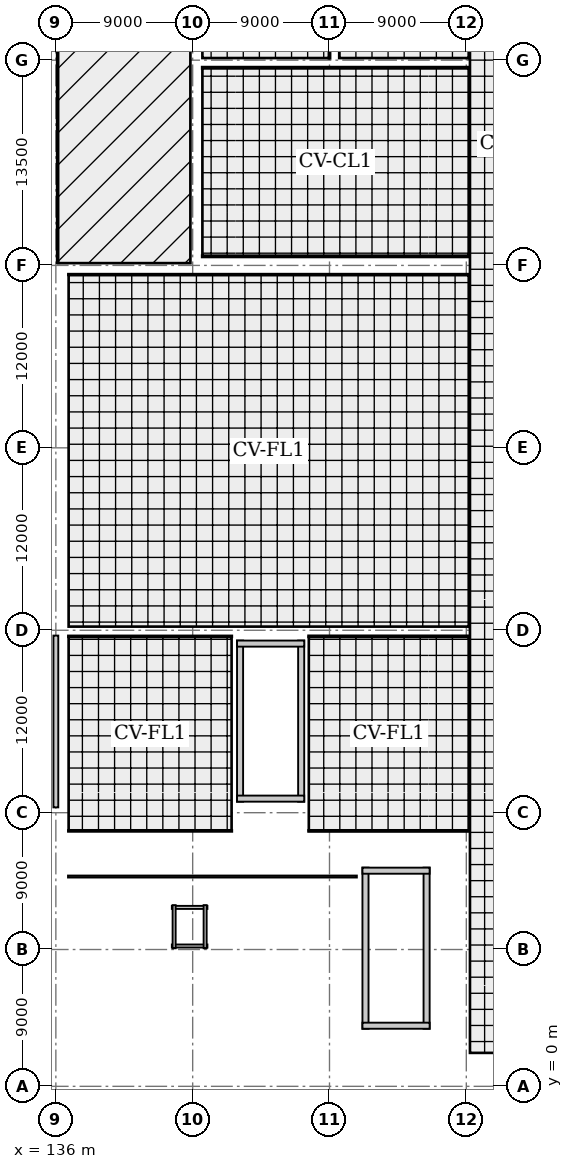
"""IFC4 building model, lengths in metres.
Left out: names, types, materials, properties, quantities, classifications, styles, units other than length and angle.
Written with IfcOpenShell. Run it as: python <this file> out.ifc"""

import sys

from ifc_helpers import new_model, si_unit, direction, frame, frame_2d, origin, origin_2d, place, context, subcontext, project, spatial, rectangle, extrude, element, fill, save


model = new_model("IFC4")
c1 = context("Model", 3, precision=1e-05, world=origin(), true_north=direction((0.0, 1.0)))
c2 = subcontext(c1, "Body", "Model", "MODEL_VIEW")
j1 = project(units=[si_unit("LENGTHUNIT", "METRE"), si_unit("PLANEANGLEUNIT", "RADIAN")], contexts=[c1])
p1 = place(None, origin())
s1 = spatial("IfcSite", under=j1, at=p1, CompositionType="ELEMENT")
p2 = place(p1, origin())
s2 = spatial("IfcBuilding", under=s1, at=p2, CompositionType="ELEMENT")
p3 = place(p2, frame((0.0, 0.0, 6.6)))
s3 = spatial("IfcBuildingStorey", under=s2, at=p3, CompositionType="ELEMENT", Elevation=6.6)
for number, where, z_axis, x_axis in (
    (1, (136.0, 0.0, 0.0), (0.0, 0.0, 1.0), (1.0, 0.0, 0.0)),
    (2, (136.0, 9.0, 0.0), (0.0, 0.0, 1.0), (1.0, 0.0, 0.0)),
    (3, (136.0, 18.0, 0.0), (0.0, 0.0, 1.0), (1.0, 0.0, 0.0)),
    (4, (136.0, 30.0, 0.0), (0.0, 0.0, 1.0), (1.0, 0.0, 0.0)),
    (5, (136.0, 42.0, 0.0), (0.0, 0.0, 1.0), (1.0, 0.0, 0.0)),
    (6, (136.0, 54.0, 0.0), (0.0, 0.0, 1.0), (1.0, 0.0, 0.0)),
    (7, (145.0, 0.0, 0.0), (0.0, 0.0, 1.0), (1.0, 0.0, 0.0)),
    (8, (145.0, 9.0, 0.0), (0.0, 0.0, 1.0), (1.0, 0.0, 0.0)),
    (9, (145.0, 18.0, 0.0), (0.0, 0.0, 1.0), (1.0, 0.0, 0.0)),
    (10, (145.0, 30.0, 0.0), (0.0, 0.0, 1.0), (1.0, 0.0, 0.0)),
    (11, (145.0, 42.0, 0.0), (0.0, 0.0, 1.0), (1.0, 0.0, 0.0)),
    (12, (145.0, 54.0, 0.0), (0.0, 0.0, 1.0), (1.0, 0.0, 0.0)),
):
    element("IfcColumn", number, at=place(p3, frame(where, z_axis=z_axis, x_axis=x_axis)), inside=s3, PredefinedType="COLUMN", context=c2, shape_type="SweptSolid", body=[
        extrude(rectangle(XDim=0.7, YDim=0.7, at=origin_2d()), origin(), (0.0, 0.0, 1.0), 4.2),
    ])
p4 = place(p3, frame((145.0, 67.5, 0.0), z_axis=(0.0, 0.0, 1.0), x_axis=(1.0, 0.0, 0.0)))
e13 = element("IfcColumn", 13, at=p4, inside=s3, PredefinedType="COLUMN", context=c2, shape_type="SweptSolid", body=[
    extrude(rectangle(XDim=0.8, YDim=0.8, at=origin_2d()), origin(), (0.0, 0.0, 1.0), 4.2),
])
for number, where, z_axis, x_axis in (
    (14, (154.0, 0.0, 0.0), (0.0, 0.0, 1.0), (1.0, 0.0, 0.0)),
    (15, (154.0, 9.0, 0.0), (0.0, 0.0, 1.0), (1.0, 0.0, 0.0)),
    (16, (154.0, 18.0, 0.0), (0.0, 0.0, 1.0), (1.0, 0.0, 0.0)),
    (17, (154.0, 30.0, 0.0), (0.0, 0.0, 1.0), (1.0, 0.0, 0.0)),
    (18, (154.0, 42.0, 0.0), (0.0, 0.0, 1.0), (1.0, 0.0, 0.0)),
    (19, (154.0, 54.0, 0.0), (0.0, 0.0, 1.0), (1.0, 0.0, 0.0)),
):
    element("IfcColumn", number, at=place(p3, frame(where, z_axis=z_axis, x_axis=x_axis)), inside=s3, PredefinedType="COLUMN", context=c2, shape_type="SweptSolid", body=[
        extrude(rectangle(XDim=0.7, YDim=0.7, at=origin_2d()), origin(), (0.0, 0.0, 1.0), 4.2),
    ])
p5 = place(p3, frame((154.0, 67.5, 0.0), z_axis=(0.0, 0.0, 1.0), x_axis=(1.0, 0.0, 0.0)))
e20 = element("IfcColumn", 20, at=p5, inside=s3, PredefinedType="COLUMN", context=c2, shape_type="SweptSolid", body=[
    extrude(rectangle(XDim=0.8, YDim=0.8, at=origin_2d()), origin(), (0.0, 0.0, 1.0), 4.2),
])
for number, where, z_axis, x_axis in (
    (21, (163.0, 0.0, 0.0), (0.0, 0.0, 1.0), (1.0, 0.0, 0.0)),
    (22, (163.0, 9.0, 0.0), (0.0, 0.0, 1.0), (1.0, 0.0, 0.0)),
    (23, (163.0, 18.0, 0.0), (0.0, 0.0, 1.0), (1.0, 0.0, 0.0)),
    (24, (163.0, 30.0, 0.0), (0.0, 0.0, 1.0), (1.0, 0.0, 0.0)),
    (25, (163.0, 42.0, 0.0), (0.0, 0.0, 1.0), (1.0, 0.0, 0.0)),
    (26, (163.0, 54.0, 0.0), (0.0, 0.0, 1.0), (1.0, 0.0, 0.0)),
):
    element("IfcColumn", number, at=place(p3, frame(where, z_axis=z_axis, x_axis=x_axis)), inside=s3, PredefinedType="COLUMN", context=c2, shape_type="SweptSolid", body=[
        extrude(rectangle(XDim=0.7, YDim=0.7, at=origin_2d()), origin(), (0.0, 0.0, 1.0), 4.2),
    ])
p6 = place(p3, frame((163.0, 67.5, 0.0), z_axis=(0.0, 0.0, 1.0), x_axis=(1.0, 0.0, 0.0)))
e27 = element("IfcColumn", 27, at=p6, inside=s3, PredefinedType="COLUMN", context=c2, shape_type="SweptSolid", body=[
    extrude(rectangle(XDim=0.8, YDim=0.8, at=origin_2d()), origin(), (0.0, 0.0, 1.0), 4.2),
])
p7 = place(p3, frame((136.0, 18.35, 0.0), z_axis=(0.0, 0.0, 1.0), x_axis=(0.0, 1.0, 0.0)))
e28 = element("IfcWall", 28, at=p7, inside=s3, PredefinedType="SOLIDWALL", context=c2, shape_type="SweptSolid", body=[
    extrude(rectangle(XDim=11.3, YDim=0.32, at=frame_2d((5.65, 0.0))), origin(), (0.0, 0.0, 1.0), 3.385),
])
p8 = place(p3, frame((136.15, 54.15, 0.0), z_axis=(0.0, 0.0, 1.0), x_axis=(0.0, 1.0, 0.0)))
e29 = element("IfcWall", 29, at=p8, inside=s3, PredefinedType="PARAPET", context=c2, shape_type="SweptSolid", body=[
    extrude(rectangle(XDim=49.2, YDim=0.18, at=frame_2d((24.6, 0.0))), origin(), (0.0, 0.0, 1.0), 1.2),
])
for number, where, z_axis, x_axis in (
    (30, (152.137, 18.725, 0.0), (0.0, 0.0, 1.0), (0.0, 1.0, 0.0)),
    (31, (148.117, 29.323, 0.0), (0.0, 0.0, 1.0), (0.0, -1.0, 0.0)),
):
    element("IfcWall", number, at=place(p3, frame(where, z_axis=z_axis, x_axis=x_axis)), inside=s3, PredefinedType="SHEAR", context=c2, shape_type="SweptSolid", body=[
        extrude(rectangle(XDim=10.597, YDim=0.4, at=frame_2d((5.299, 0.0))), origin(), (0.0, 0.0, 1.0), 3.96),
    ])
p9 = place(p3, frame((152.337, 29.123, 0.0), z_axis=(0.0, 0.0, 1.0), x_axis=(-1.0, 0.0, 0.0)))
e32 = element("IfcWall", 32, at=p9, inside=s3, PredefinedType="SHEAR", context=c2, shape_type="SweptSolid", body=[
    extrude(rectangle(XDim=4.42, YDim=0.4, at=frame_2d((2.21, 0.0))), origin(), (0.0, 0.0, 1.0), 3.96),
])
p10 = place(p3, frame((147.917, 18.925, 0.0), z_axis=(0.0, 0.0, 1.0), x_axis=(1.0, 0.0, 0.0)))
e33 = element("IfcWall", 33, at=p10, inside=s3, PredefinedType="SHEAR", context=c2, shape_type="SweptSolid", body=[
    extrude(rectangle(XDim=4.42, YDim=0.4, at=frame_2d((2.21, 0.0))), origin(), (0.0, 0.0, 1.0), 3.96),
])
p11 = place(p10, frame((0.95, 0.0, 0.0)))
e34 = element("IfcOpeningElement", 34, at=p11, cuts=e33, PredefinedType="OPENING", context=c2, shape_type="SweptSolid", body=[
    extrude(rectangle(XDim=1.3, YDim=2.1, at=frame_2d((0.65, 1.05))), frame((0.0, 0.21, 0.0), z_axis=(0.0, -1.0, 0.0), x_axis=(1.0, 0.0, 0.0)), (0.0, 0.0, 1.0), 0.42),
])
p12 = place(p3, frame((160.387, 3.788, 0.0), z_axis=(0.0, 0.0, 1.0), x_axis=(0.0, 1.0, 0.0)))
e35 = element("IfcWall", 35, at=p12, inside=s3, PredefinedType="SHEAR", context=c2, shape_type="SweptSolid", body=[
    extrude(rectangle(XDim=10.597, YDim=0.4, at=frame_2d((5.299, 0.0))), origin(), (0.0, 0.0, 1.0), 3.96),
])
p13 = place(p3, frame((156.367, 14.385, 0.0), z_axis=(0.0, 0.0, 1.0), x_axis=(0.0, -1.0, 0.0)))
e36 = element("IfcWall", 36, at=p13, inside=s3, PredefinedType="SHEAR", context=c2, shape_type="SweptSolid", body=[
    extrude(rectangle(XDim=10.597, YDim=0.4, at=frame_2d((5.299, 0.0))), origin(), (0.0, 0.0, 1.0), 3.96),
])
p14 = place(p13, frame((8.498, 0.0, 0.0)))
e37 = element("IfcOpeningElement", 37, at=p14, cuts=e36, PredefinedType="OPENING", context=c2, shape_type="SweptSolid", body=[
    extrude(rectangle(XDim=1.3, YDim=2.1, at=frame_2d((0.65, 1.05))), frame((0.0, 0.21, 0.0), z_axis=(0.0, -1.0, 0.0), x_axis=(1.0, 0.0, 0.0)), (0.0, 0.0, 1.0), 0.42),
])
for number, where, z_axis, x_axis in (
    (38, (160.587, 14.185, 0.0), (0.0, 0.0, 1.0), (-1.0, 0.0, 0.0)),
    (39, (156.167, 3.988, 0.0), (0.0, 0.0, 1.0), (1.0, 0.0, 0.0)),
):
    element("IfcWall", number, at=place(p3, frame(where, z_axis=z_axis, x_axis=x_axis)), inside=s3, PredefinedType="SHEAR", context=c2, shape_type="SweptSolid", body=[
        extrude(rectangle(XDim=4.42, YDim=0.4, at=frame_2d((2.21, 0.0))), origin(), (0.0, 0.0, 1.0), 3.96),
    ])
for number, where, z_axis, x_axis in (
    (40, (137.925, 19.4, 0.0), (0.0, 0.0, 1.0), (1.0, 0.0, 0.0)),
    (41, (145.123, 23.22, 0.0), (0.0, 0.0, 1.0), (-1.0, 0.0, 0.0)),
):
    element("IfcWall", number, at=place(p3, frame(where, z_axis=z_axis, x_axis=x_axis)), inside=s3, PredefinedType="SOLIDWALL", context=c2, shape_type="SweptSolid", body=[
        extrude(rectangle(XDim=7.198, YDim=0.2, at=frame_2d((3.599, 0.0))), origin(), (0.0, 0.0, 1.0), 3.96),
    ])
p15 = place(p3, frame((145.022, 19.3, 0.0), z_axis=(0.0, 0.0, 1.0), x_axis=(0.0, 1.0, 0.0)))
e42 = element("IfcWall", 42, at=p15, inside=s3, PredefinedType="SOLIDWALL", context=c2, shape_type="SweptSolid", body=[
    extrude(rectangle(XDim=4.02, YDim=0.2, at=frame_2d((2.01, 0.0))), origin(), (0.0, 0.0, 1.0), 3.96),
])
p16 = place(p3, frame((143.63, 9.23, 0.0), z_axis=(0.0, 0.0, 1.0), x_axis=(1.0, 0.0, 0.0)))
e43 = element("IfcWall", 43, at=p16, inside=s3, PredefinedType="SOLIDWALL", context=c2, shape_type="SweptSolid", body=[
    extrude(rectangle(XDim=2.34, YDim=0.2, at=frame_2d((1.17, 0.0))), origin(), (0.0, 0.0, 1.0), 3.495),
])
p17 = place(p3, frame((145.97, 11.77, 0.0), z_axis=(0.0, 0.0, 1.0), x_axis=(-1.0, 0.0, 0.0)))
e44 = element("IfcWall", 44, at=p17, inside=s3, PredefinedType="SOLIDWALL", context=c2, shape_type="SweptSolid", body=[
    extrude(rectangle(XDim=2.34, YDim=0.2, at=frame_2d((1.17, 0.0))), origin(), (0.0, 0.0, 1.0), 3.935),
])
p18 = place(p3, frame((143.78, 11.92, 0.0), z_axis=(0.0, 0.0, 1.0), x_axis=(0.0, -1.0, 0.0)))
e45 = element("IfcWall", 45, at=p18, inside=s3, PredefinedType="SOLIDWALL", context=c2, shape_type="SweptSolid", body=[
    extrude(rectangle(XDim=2.84, YDim=0.2, at=frame_2d((1.42, 0.0))), origin(), (0.0, 0.0, 1.0), 3.495),
])
p19 = place(p3, frame((145.82, 9.08, 0.0), z_axis=(0.0, 0.0, 1.0), x_axis=(0.0, 1.0, 0.0)))
e46 = element("IfcWall", 46, at=p19, inside=s3, PredefinedType="SOLIDWALL", context=c2, shape_type="SweptSolid", body=[
    extrude(rectangle(XDim=2.84, YDim=0.2, at=frame_2d((1.42, 0.0))), origin(), (0.0, 0.0, 1.0), 3.495),
])
p20 = place(p19, frame((0.87, 0.0, 0.0)))
e47 = element("IfcOpeningElement", 47, at=p20, cuts=e46, PredefinedType="OPENING", context=c2, shape_type="SweptSolid", body=[
    extrude(rectangle(XDim=1.1, YDim=2.15, at=frame_2d((0.55, 1.075))), frame((0.0, 0.11, 0.0), z_axis=(0.0, -1.0, 0.0), x_axis=(1.0, 0.0, 0.0)), (0.0, 0.0, 1.0), 0.22),
])
p21 = place(p3, frame((136.8, 13.8, 0.0), z_axis=(0.0, 0.0, 1.0), x_axis=(1.0, 0.0, 0.0)))
e48 = element("IfcWall", 48, at=p21, inside=s3, PredefinedType="PARTITIONING", context=c2, shape_type="SweptSolid", body=[
    extrude(rectangle(XDim=19.0, YDim=0.13, at=frame_2d((9.5, 0.0))), origin(), (0.0, 0.0, 1.0), 3.545),
])
p22 = place(p21, frame((8.675, 0.0, 0.0)))
e49 = element("IfcOpeningElement", 49, at=p22, cuts=e48, PredefinedType="OPENING", context=c2, shape_type="SweptSolid", body=[
    extrude(rectangle(XDim=1.65, YDim=2.1, at=frame_2d((0.825, 1.05))), frame((0.0, 0.075, 0.0), z_axis=(0.0, -1.0, 0.0), x_axis=(1.0, 0.0, 0.0)), (0.0, 0.0, 1.0), 0.15),
])
p23 = place(p21, frame((14.44, 0.0, 0.0)))
e50 = element("IfcOpeningElement", 50, at=p23, cuts=e48, PredefinedType="OPENING", context=c2, shape_type="SweptSolid", body=[
    extrude(rectangle(XDim=1.65, YDim=2.1, at=frame_2d((0.825, 1.05))), frame((0.0, 0.075, 0.0), z_axis=(0.0, -1.0, 0.0), x_axis=(1.0, 0.0, 0.0)), (0.0, 0.0, 1.0), 0.15),
])
p24 = place(p3, frame((163.2, 16.8, 0.0), z_axis=(0.0, 0.0, 1.0), x_axis=(-1.0, 0.0, 0.0)))
e51 = element("IfcWall", 51, at=p24, inside=s3, PredefinedType="PARTITIONING", context=c2, shape_type="SweptSolid", body=[
    extrude(rectangle(XDim=10.6, YDim=0.12, at=frame_2d((5.3, 0.0))), origin(), (0.0, 0.0, 1.0), 3.545),
])
p25 = place(p3, frame((152.6, 29.6, 0.0), z_axis=(0.0, 0.0, 1.0), x_axis=(1.0, 0.0, 0.0)))
e52 = element("IfcWall", 52, at=p25, inside=s3, PredefinedType="PARTITIONING", context=c2, shape_type="SweptSolid", body=[
    extrude(rectangle(XDim=10.6, YDim=0.12, at=frame_2d((5.3, 0.0))), origin(), (0.0, 0.0, 1.0), 3.385),
])
p26 = place(p3, frame((163.2, 29.6, 0.0), z_axis=(0.0, 0.0, 1.0), x_axis=(0.0, -1.0, 0.0)))
e53 = element("IfcWall", 53, at=p26, inside=s3, PredefinedType="PARTITIONING", context=c2, shape_type="SweptSolid", body=[
    extrude(rectangle(XDim=12.8, YDim=0.12, at=frame_2d((6.4, 0.0))), origin(), (0.0, 0.0, 1.0), 3.385),
])
p27 = place(p26, frame((5.625, 0.0, 0.0)))
e54 = element("IfcOpeningElement", 54, at=p27, cuts=e53, PredefinedType="OPENING", context=c2, shape_type="SweptSolid", body=[
    extrude(rectangle(XDim=1.55, YDim=2.1, at=frame_2d((0.775, 1.05))), frame((0.0, 0.07, 0.0), z_axis=(0.0, -1.0, 0.0), x_axis=(1.0, 0.0, 0.0)), (0.0, 0.0, 1.0), 0.14),
])
p28 = place(p3, frame((147.6, 16.8, 0.0), z_axis=(0.0, 0.0, 1.0), x_axis=(-1.0, 0.0, 0.0)))
e55 = element("IfcWall", 55, at=p28, inside=s3, PredefinedType="PARTITIONING", context=c2, shape_type="SweptSolid", body=[
    extrude(rectangle(XDim=10.8, YDim=0.11, at=frame_2d((5.4, 0.0))), origin(), (0.0, 0.0, 1.0), 3.545),
])
p29 = place(p28, frame((4.725, 0.0, 0.0)))
e56 = element("IfcOpeningElement", 56, at=p29, cuts=e55, PredefinedType="OPENING", context=c2, shape_type="SweptSolid", body=[
    extrude(rectangle(XDim=1.35, YDim=2.1, at=frame_2d((0.675, 1.05))), frame((0.0, 0.065, 0.0), z_axis=(0.0, -1.0, 0.0), x_axis=(1.0, 0.0, 0.0)), (0.0, 0.0, 1.0), 0.13),
])
p30 = place(p3, frame((136.8, 29.6, 0.0), z_axis=(0.0, 0.0, 1.0), x_axis=(1.0, 0.0, 0.0)))
e57 = element("IfcWall", 57, at=p30, inside=s3, PredefinedType="PARTITIONING", context=c2, shape_type="SweptSolid", body=[
    extrude(rectangle(XDim=10.8, YDim=0.11, at=frame_2d((5.4, 0.0))), origin(), (0.0, 0.0, 1.0), 3.385),
])
p31 = place(p3, frame((136.8, 53.4, 0.0), z_axis=(0.0, 0.0, 1.0), x_axis=(1.0, 0.0, 0.0)))
e58 = element("IfcWall", 58, at=p31, inside=s3, PredefinedType="PARTITIONING", context=c2, shape_type="SweptSolid", body=[
    extrude(rectangle(XDim=26.4, YDim=0.1, at=frame_2d((13.2, 0.0))), origin(), (0.0, 0.0, 1.0), 3.37),
])
p32 = place(p3, frame((163.2, 53.4, 0.0), z_axis=(0.0, 0.0, 1.0), x_axis=(0.0, -1.0, 0.0)))
e59 = element("IfcWall", 59, at=p32, inside=s3, PredefinedType="PARTITIONING", context=c2, shape_type="SweptSolid", body=[
    extrude(rectangle(XDim=23.2, YDim=0.1, at=frame_2d((11.6, 0.0))), origin(), (0.0, 0.0, 1.0), 3.37),
])
p33 = place(p32, frame((12.375, 0.0, 0.0)))
e60 = element("IfcOpeningElement", 60, at=p33, cuts=e59, PredefinedType="OPENING", context=c2, shape_type="SweptSolid", body=[
    extrude(rectangle(XDim=1.65, YDim=2.1, at=frame_2d((0.825, 1.05))), frame((0.0, 0.06, 0.0), z_axis=(0.0, -1.0, 0.0), x_axis=(1.0, 0.0, 0.0)), (0.0, 0.0, 1.0), 0.12),
])
p34 = place(p32, frame((17.632, 0.0, 0.0)))
e61 = element("IfcOpeningElement", 61, at=p34, cuts=e59, PredefinedType="OPENING", context=c2, shape_type="SweptSolid", body=[
    extrude(rectangle(XDim=1.65, YDim=2.1, at=frame_2d((0.825, 1.05))), frame((0.0, 0.06, 0.0), z_axis=(0.0, -1.0, 0.0), x_axis=(1.0, 0.0, 0.0)), (0.0, 0.0, 1.0), 0.12),
])
for number, where, z_axis, x_axis in (
    (62, (163.2, 54.6, 0.0), (0.0, 0.0, 1.0), (-1.0, 0.0, 0.0)),
    (63, (145.6, 67.0, 0.0), (0.0, 0.0, 1.0), (1.0, 0.0, 0.0)),
):
    element("IfcWall", number, at=place(p3, frame(where, z_axis=z_axis, x_axis=x_axis)), inside=s3, PredefinedType="PARTITIONING", context=c2, shape_type="SweptSolid", body=[
        extrude(rectangle(XDim=17.6, YDim=0.14, at=frame_2d((8.8, 0.0))), origin(), (0.0, 0.0, 1.0), 3.37),
    ])
p35 = place(p3, frame((163.2, 67.0, 0.0), z_axis=(0.0, 0.0, 1.0), x_axis=(0.0, -1.0, 0.0)))
e64 = element("IfcWall", 64, at=p35, inside=s3, PredefinedType="PARTITIONING", context=c2, shape_type="SweptSolid", body=[
    extrude(rectangle(XDim=12.4, YDim=0.14, at=frame_2d((6.2, 0.0))), origin(), (0.0, 0.0, 1.0), 3.37),
])
p36 = place(p35, frame((5.575, 0.0, 0.0)))
e65 = element("IfcOpeningElement", 65, at=p36, cuts=e64, PredefinedType="OPENING", context=c2, shape_type="SweptSolid", body=[
    extrude(rectangle(XDim=1.25, YDim=2.1, at=frame_2d((0.625, 1.05))), frame((0.0, 0.08, 0.0), z_axis=(0.0, -1.0, 0.0), x_axis=(1.0, 0.0, 0.0)), (0.0, 0.0, 1.0), 0.16),
])
p37 = place(p3, frame((154.0, 75.8, 0.0), z_axis=(0.0, 0.0, 1.0), x_axis=(0.0, -1.0, 0.0)))
e66 = element("IfcWall", 66, at=p37, inside=s3, PredefinedType="PARTITIONING", context=c2, shape_type="SweptSolid", body=[
    extrude(rectangle(XDim=8.2, YDim=0.13, at=frame_2d((4.1, 0.0))), origin(), (0.0, 0.0, 1.0), 3.37),
])
p38 = place(p3, frame((163.2, 75.8, 0.0), z_axis=(0.0, 0.0, 1.0), x_axis=(0.0, -1.0, 0.0)))
e67 = element("IfcWall", 67, at=p38, inside=s3, PredefinedType="PARTITIONING", context=c2, shape_type="SweptSolid", body=[
    extrude(rectangle(XDim=8.2, YDim=0.12, at=frame_2d((4.1, 0.0))), origin(), (0.0, 0.0, 1.0), 3.37),
])
p39 = place(p11, origin())
e68 = element("IfcDoor", 68, at=p39, inside=s3, OperationType="SINGLE_SWING_RIGHT", PredefinedType="DOOR", context=c2, shape_type="SweptSolid", body=[
    extrude(rectangle(XDim=1.3, YDim=2.1, at=frame_2d((0.65, 1.05))), frame((0.0, 0.025, 0.0), z_axis=(0.0, -1.0, 0.0), x_axis=(1.0, 0.0, 0.0)), (0.0, 0.0, 1.0), 0.05),
])
fill(e34, e68)
p40 = place(p14, origin())
e69 = element("IfcDoor", 69, at=p40, inside=s3, OperationType="SINGLE_SWING_LEFT", PredefinedType="DOOR", context=c2, shape_type="SweptSolid", body=[
    extrude(rectangle(XDim=1.3, YDim=2.1, at=frame_2d((0.65, 1.05))), frame((0.0, 0.025, 0.0), z_axis=(0.0, -1.0, 0.0), x_axis=(1.0, 0.0, 0.0)), (0.0, 0.0, 1.0), 0.05),
])
fill(e37, e69)
p41 = place(p20, origin())
e70 = element("IfcDoor", 70, at=p41, inside=s3, OperationType="SLIDING_TO_LEFT", PredefinedType="DOOR", context=c2, shape_type="SweptSolid", body=[
    extrude(rectangle(XDim=1.1, YDim=2.15, at=frame_2d((0.55, 1.075))), frame((0.0, 0.025, 0.0), z_axis=(0.0, -1.0, 0.0), x_axis=(1.0, 0.0, 0.0)), (0.0, 0.0, 1.0), 0.05),
])
fill(e47, e70)
p42 = place(p22, origin())
e71 = element("IfcDoor", 71, at=p42, inside=s3, OperationType="SINGLE_SWING_RIGHT", PredefinedType="DOOR", context=c2, shape_type="SweptSolid", body=[
    extrude(rectangle(XDim=1.65, YDim=2.1, at=frame_2d((0.825, 1.05))), frame((0.0, 0.025, 0.0), z_axis=(0.0, -1.0, 0.0), x_axis=(1.0, 0.0, 0.0)), (0.0, 0.0, 1.0), 0.05),
])
fill(e49, e71)
p43 = place(p23, origin())
e72 = element("IfcDoor", 72, at=p43, inside=s3, OperationType="SINGLE_SWING_LEFT", PredefinedType="DOOR", context=c2, shape_type="SweptSolid", body=[
    extrude(rectangle(XDim=1.65, YDim=2.1, at=frame_2d((0.825, 1.05))), frame((0.0, 0.025, 0.0), z_axis=(0.0, -1.0, 0.0), x_axis=(1.0, 0.0, 0.0)), (0.0, 0.0, 1.0), 0.05),
])
fill(e50, e72)
p44 = place(p27, origin())
e73 = element("IfcDoor", 73, at=p44, inside=s3, OperationType="SINGLE_SWING_RIGHT", PredefinedType="DOOR", context=c2, shape_type="SweptSolid", body=[
    extrude(rectangle(XDim=1.55, YDim=2.1, at=frame_2d((0.775, 1.05))), frame((0.0, 0.025, 0.0), z_axis=(0.0, -1.0, 0.0), x_axis=(1.0, 0.0, 0.0)), (0.0, 0.0, 1.0), 0.05),
])
fill(e54, e73)
p45 = place(p29, origin())
e74 = element("IfcDoor", 74, at=p45, inside=s3, OperationType="SINGLE_SWING_LEFT", PredefinedType="DOOR", context=c2, shape_type="SweptSolid", body=[
    extrude(rectangle(XDim=1.35, YDim=2.1, at=frame_2d((0.675, 1.05))), frame((0.0, 0.025, 0.0), z_axis=(0.0, -1.0, 0.0), x_axis=(1.0, 0.0, 0.0)), (0.0, 0.0, 1.0), 0.05),
])
fill(e56, e74)
p46 = place(p33, origin())
e75 = element("IfcDoor", 75, at=p46, inside=s3, OperationType="SINGLE_SWING_RIGHT", PredefinedType="DOOR", context=c2, shape_type="SweptSolid", body=[
    extrude(rectangle(XDim=1.65, YDim=2.1, at=frame_2d((0.825, 1.05))), frame((0.0, 0.025, 0.0), z_axis=(0.0, -1.0, 0.0), x_axis=(1.0, 0.0, 0.0)), (0.0, 0.0, 1.0), 0.05),
])
fill(e60, e75)
p47 = place(p34, origin())
e76 = element("IfcDoor", 76, at=p47, inside=s3, OperationType="SINGLE_SWING_LEFT", PredefinedType="DOOR", context=c2, shape_type="SweptSolid", body=[
    extrude(rectangle(XDim=1.65, YDim=2.1, at=frame_2d((0.825, 1.05))), frame((0.0, 0.025, 0.0), z_axis=(0.0, -1.0, 0.0), x_axis=(1.0, 0.0, 0.0)), (0.0, 0.0, 1.0), 0.05),
])
fill(e61, e76)
p48 = place(p36, origin())
e77 = element("IfcDoor", 77, at=p48, inside=s3, OperationType="SINGLE_SWING_LEFT", PredefinedType="DOOR", context=c2, shape_type="SweptSolid", body=[
    extrude(rectangle(XDim=1.25, YDim=2.1, at=frame_2d((0.625, 1.05))), frame((0.0, 0.025, 0.0), z_axis=(0.0, -1.0, 0.0), x_axis=(1.0, 0.0, 0.0)), (0.0, 0.0, 1.0), 0.05),
])
fill(e65, e77)
save(model, sys.argv[1])
